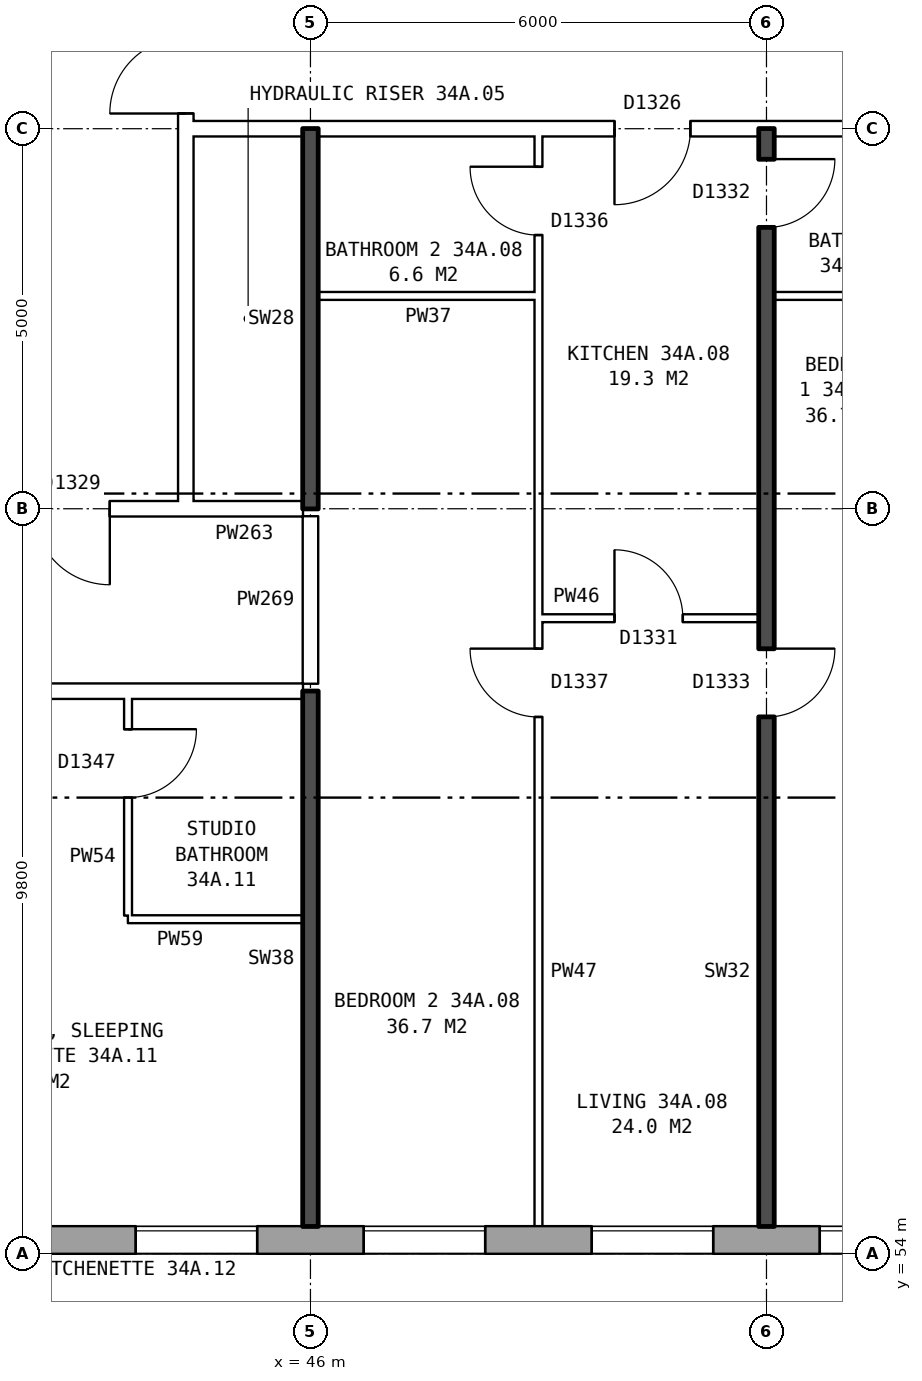
"""IFC4 building model, lengths in metres.
Left out: names, types, materials, properties, quantities, classifications, styles, units other than length and angle.
Written with IfcOpenShell. Run it as: python <this file> out.ifc"""

import sys

from ifc_helpers import new_model, si_unit, direction, frame, frame_2d, origin, place, context, subcontext, project, spatial, rectangle, extrude, element, fill, save


model = new_model("IFC4")
c1 = context("Model", 3, precision=1e-05, world=origin(), true_north=direction((0.0, 1.0)))
c2 = subcontext(c1, "Body", "Model", "MODEL_VIEW")
j1 = project(units=[si_unit("LENGTHUNIT", "METRE"), si_unit("PLANEANGLEUNIT", "RADIAN")], contexts=[c1])
p1 = place(None, origin())
s1 = spatial("IfcSite", under=j1, at=p1, CompositionType="ELEMENT")
p2 = place(p1, origin())
s2 = spatial("IfcBuilding", under=s1, at=p2, CompositionType="ELEMENT")
p3 = place(p2, frame((0.0, 0.0, 123.7)))
s3 = spatial("IfcBuildingStorey", under=s2, at=p3, CompositionType="ELEMENT", Elevation=123.7)
p4 = place(p3, frame((29.825, 54.18, 0.0), z_axis=(0.0, 0.0, 1.0), x_axis=(1.0, 0.0, 0.0)))
e1 = element("IfcWall", 1, at=p4, inside=s3, PredefinedType="STANDARD", context=c2, shape_type="SweptSolid", body=[
    extrude(rectangle(XDim=43.101, YDim=0.36, at=frame_2d((21.55, 0.0))), origin(), (0.0, 0.0, 1.0), 2.85),
])
p5 = place(p4, frame((0.3, 0.0, 0.8)))
e2 = element("IfcOpeningElement", 2, at=p5, cuts=e1, PredefinedType="OPENING", context=c2, shape_type="SweptSolid", body=[
    extrude(rectangle(XDim=1.6, YDim=1.8, at=frame_2d((0.8, 0.9))), frame((0.0, 0.19, 0.0), z_axis=(0.0, -1.0, 0.0), x_axis=(1.0, 0.0, 0.0)), (0.0, 0.0, 1.0), 0.38),
])
p6 = place(p4, frame((4.875, 0.0, 0.8)))
e3 = element("IfcOpeningElement", 3, at=p6, cuts=e1, PredefinedType="OPENING", context=c2, shape_type="SweptSolid", body=[
    extrude(rectangle(XDim=1.6, YDim=1.8, at=frame_2d((0.8, 0.9))), frame((0.0, 0.19, 0.0), z_axis=(0.0, -1.0, 0.0), x_axis=(1.0, 0.0, 0.0)), (0.0, 0.0, 1.0), 0.38),
])
p7 = place(p4, frame((7.875, 0.0, 0.8)))
e4 = element("IfcOpeningElement", 4, at=p7, cuts=e1, PredefinedType="OPENING", context=c2, shape_type="SweptSolid", body=[
    extrude(rectangle(XDim=1.6, YDim=1.8, at=frame_2d((0.8, 0.9))), frame((0.0, 0.19, 0.0), z_axis=(0.0, -1.0, 0.0), x_axis=(1.0, 0.0, 0.0)), (0.0, 0.0, 1.0), 0.38),
])
p8 = place(p4, frame((10.875, 0.0, 0.8)))
e5 = element("IfcOpeningElement", 5, at=p8, cuts=e1, PredefinedType="OPENING", context=c2, shape_type="SweptSolid", body=[
    extrude(rectangle(XDim=1.6, YDim=1.8, at=frame_2d((0.8, 0.9))), frame((0.0, 0.19, 0.0), z_axis=(0.0, -1.0, 0.0), x_axis=(1.0, 0.0, 0.0)), (0.0, 0.0, 1.0), 0.38),
])
p9 = place(p4, frame((13.875, 0.0, 0.8)))
e6 = element("IfcOpeningElement", 6, at=p9, cuts=e1, PredefinedType="OPENING", context=c2, shape_type="SweptSolid", body=[
    extrude(rectangle(XDim=1.6, YDim=1.8, at=frame_2d((0.8, 0.9))), frame((0.0, 0.19, 0.0), z_axis=(0.0, -1.0, 0.0), x_axis=(1.0, 0.0, 0.0)), (0.0, 0.0, 1.0), 0.38),
])
p10 = place(p4, frame((16.875, 0.0, 0.8)))
e7 = element("IfcOpeningElement", 7, at=p10, cuts=e1, PredefinedType="OPENING", context=c2, shape_type="SweptSolid", body=[
    extrude(rectangle(XDim=1.6, YDim=1.8, at=frame_2d((0.8, 0.9))), frame((0.0, 0.19, 0.0), z_axis=(0.0, -1.0, 0.0), x_axis=(1.0, 0.0, 0.0)), (0.0, 0.0, 1.0), 0.38),
])
p11 = place(p4, frame((19.875, 0.0, 0.8)))
e8 = element("IfcOpeningElement", 8, at=p11, cuts=e1, PredefinedType="OPENING", context=c2, shape_type="SweptSolid", body=[
    extrude(rectangle(XDim=1.6, YDim=1.8, at=frame_2d((0.8, 0.9))), frame((0.0, 0.19, 0.0), z_axis=(0.0, -1.0, 0.0), x_axis=(1.0, 0.0, 0.0)), (0.0, 0.0, 1.0), 0.38),
])
p12 = place(p4, frame((22.875, 0.0, 0.8)))
e9 = element("IfcOpeningElement", 9, at=p12, cuts=e1, PredefinedType="OPENING", context=c2, shape_type="SweptSolid", body=[
    extrude(rectangle(XDim=1.6, YDim=1.8, at=frame_2d((0.8, 0.9))), frame((0.0, 0.19, 0.0), z_axis=(0.0, -1.0, 0.0), x_axis=(1.0, 0.0, 0.0)), (0.0, 0.0, 1.0), 0.38),
])
p13 = place(p4, frame((25.875, 0.0, 0.8)))
e10 = element("IfcOpeningElement", 10, at=p13, cuts=e1, PredefinedType="OPENING", context=c2, shape_type="SweptSolid", body=[
    extrude(rectangle(XDim=1.6, YDim=1.8, at=frame_2d((0.8, 0.9))), frame((0.0, 0.19, 0.0), z_axis=(0.0, -1.0, 0.0), x_axis=(1.0, 0.0, 0.0)), (0.0, 0.0, 1.0), 0.38),
])
p14 = place(p4, frame((28.875, 0.0, 0.8)))
e11 = element("IfcOpeningElement", 11, at=p14, cuts=e1, PredefinedType="OPENING", context=c2, shape_type="SweptSolid", body=[
    extrude(rectangle(XDim=1.6, YDim=1.8, at=frame_2d((0.8, 0.9))), frame((0.0, 0.19, 0.0), z_axis=(0.0, -1.0, 0.0), x_axis=(1.0, 0.0, 0.0)), (0.0, 0.0, 1.0), 0.38),
])
p15 = place(p4, frame((31.875, 0.0, 0.8)))
e12 = element("IfcOpeningElement", 12, at=p15, cuts=e1, PredefinedType="OPENING", context=c2, shape_type="SweptSolid", body=[
    extrude(rectangle(XDim=1.6, YDim=1.8, at=frame_2d((0.8, 0.9))), frame((0.0, 0.19, 0.0), z_axis=(0.0, -1.0, 0.0), x_axis=(1.0, 0.0, 0.0)), (0.0, 0.0, 1.0), 0.38),
])
p16 = place(p4, frame((34.875, 0.0, 0.8)))
e13 = element("IfcOpeningElement", 13, at=p16, cuts=e1, PredefinedType="OPENING", context=c2, shape_type="SweptSolid", body=[
    extrude(rectangle(XDim=1.6, YDim=1.8, at=frame_2d((0.8, 0.9))), frame((0.0, 0.19, 0.0), z_axis=(0.0, -1.0, 0.0), x_axis=(1.0, 0.0, 0.0)), (0.0, 0.0, 1.0), 0.38),
])
p17 = place(p4, frame((36.775, 0.0, 0.8)))
e14 = element("IfcOpeningElement", 14, at=p17, cuts=e1, PredefinedType="OPENING", context=c2, shape_type="SweptSolid", body=[
    extrude(rectangle(XDim=1.2, YDim=1.8, at=frame_2d((0.6, 0.9))), frame((0.0, 0.19, 0.0), z_axis=(0.0, -1.0, 0.0), x_axis=(1.0, 0.0, 0.0)), (0.0, 0.0, 1.0), 0.38),
])
p18 = place(p4, frame((40.875, 0.0, 0.8)))
e15 = element("IfcOpeningElement", 15, at=p18, cuts=e1, PredefinedType="OPENING", context=c2, shape_type="SweptSolid", body=[
    extrude(rectangle(XDim=1.6, YDim=1.8, at=frame_2d((0.8, 0.9))), frame((0.0, 0.19, 0.0), z_axis=(0.0, -1.0, 0.0), x_axis=(1.0, 0.0, 0.0)), (0.0, 0.0, 1.0), 0.38),
])
p19 = place(p4, frame((2.2, 0.0, 1.7)))
e16 = element("IfcOpeningElement", 16, at=p19, cuts=e1, PredefinedType="OPENING", context=c2, shape_type="SweptSolid", body=[
    extrude(rectangle(XDim=0.8, YDim=0.9, at=frame_2d((0.4, 0.45))), frame((0.0, 0.19, 0.0), z_axis=(0.0, -1.0, 0.0), x_axis=(1.0, 0.0, 0.0)), (0.0, 0.0, 1.0), 0.38),
])
p20 = place(p4, frame((38.275, 0.0, 0.8)))
e17 = element("IfcOpeningElement", 17, at=p20, cuts=e1, PredefinedType="OPENING", context=c2, shape_type="SweptSolid", body=[
    extrude(rectangle(XDim=0.6, YDim=0.9, at=frame_2d((0.3, 0.45))), frame((0.0, 0.19, 0.0), z_axis=(0.0, -1.0, 0.0), x_axis=(1.0, 0.0, 0.0)), (0.0, 0.0, 1.0), 0.38),
])
p21 = place(p3, frame((44.36, 63.9, 0.0), z_axis=(0.0, 0.0, 1.0), x_axis=(0.0, 1.0, 0.0)))
e18 = element("IfcWall", 18, at=p21, inside=s3, PredefinedType="PARTITIONING", context=c2, shape_type="SweptSolid", body=[
    extrude(rectangle(XDim=12.2, YDim=0.2, at=frame_2d((6.1, 0.0))), origin(), (0.0, 0.0, 1.0), 2.85),
])
p22 = place(p21, frame((5.1, 0.0, 0.0)))
e19 = element("IfcOpeningElement", 19, at=p22, cuts=e18, PredefinedType="OPENING", context=c2, shape_type="SweptSolid", body=[
    extrude(rectangle(XDim=2.0, YDim=2.1, at=frame_2d((1.0, 1.05))), frame((0.0, 0.11, 0.0), z_axis=(0.0, -1.0, 0.0), x_axis=(1.0, 0.0, 0.0)), (0.0, 0.0, 1.0), 0.22),
])
p23 = place(p3, frame((43.6, 58.4, 0.0), z_axis=(0.0, 0.0, 1.0), x_axis=(1.0, 0.0, 0.0)))
e20 = element("IfcWall", 20, at=p23, inside=s3, PredefinedType="PARTITIONING", context=c2, shape_type="SweptSolid", body=[
    extrude(rectangle(XDim=2.3, YDim=0.1, at=frame_2d((1.15, 0.0))), origin(), (0.0, 0.0, 1.0), 2.85),
])
p24 = place(p3, frame((27.11, 61.4, 0.0), z_axis=(0.0, 0.0, 1.0), x_axis=(1.0, 0.0, 0.0)))
e21 = element("IfcWall", 21, at=p24, inside=s3, PredefinedType="PARTITIONING", context=c2, shape_type="SweptSolid", body=[
    extrude(rectangle(XDim=18.79, YDim=0.2, at=frame_2d((9.395, 0.0))), origin(), (0.0, 0.0, 1.0), 2.85),
])
p25 = place(p24, frame((14.19, 0.0, 0.0)))
e22 = element("IfcOpeningElement", 22, at=p25, cuts=e21, PredefinedType="OPENING", context=c2, shape_type="SweptSolid", body=[
    extrude(rectangle(XDim=1.0, YDim=2.1, at=frame_2d((0.5, 1.05))), frame((0.0, 0.11, 0.0), z_axis=(0.0, -1.0, 0.0), x_axis=(1.0, 0.0, 0.0)), (0.0, 0.0, 1.0), 0.22),
])
p26 = place(p24, frame((8.19, 0.0, 0.0)))
e23 = element("IfcOpeningElement", 23, at=p26, cuts=e21, PredefinedType="OPENING", context=c2, shape_type="SweptSolid", body=[
    extrude(rectangle(XDim=1.0, YDim=2.1, at=frame_2d((0.5, 1.05))), frame((0.0, 0.11, 0.0), z_axis=(0.0, -1.0, 0.0), x_axis=(1.0, 0.0, 0.0)), (0.0, 0.0, 1.0), 0.22),
])
p27 = place(p24, frame((1.745, 0.0, 0.0)))
e24 = element("IfcOpeningElement", 24, at=p27, cuts=e21, PredefinedType="OPENING", context=c2, shape_type="SweptSolid", body=[
    extrude(rectangle(XDim=1.0, YDim=2.1, at=frame_2d((0.5, 1.05))), frame((0.0, 0.11, 0.0), z_axis=(0.0, -1.0, 0.0), x_axis=(1.0, 0.0, 0.0)), (0.0, 0.0, 1.0), 0.22),
])
p28 = place(p3, frame((49.0, 62.36, 0.0), z_axis=(0.0, 0.0, 1.0), x_axis=(1.0, 0.0, 0.0)))
e25 = element("IfcWall", 25, at=p28, inside=s3, PredefinedType="PARTITIONING", context=c2, shape_type="SweptSolid", body=[
    extrude(rectangle(XDim=2.9, YDim=0.1, at=frame_2d((1.45, 0.0))), origin(), (0.0, 0.0, 1.0), 2.85),
])
p29 = place(p28, frame((1.0, 0.0, 0.0)))
e26 = element("IfcOpeningElement", 26, at=p29, cuts=e25, PredefinedType="OPENING", context=c2, shape_type="SweptSolid", body=[
    extrude(rectangle(XDim=0.9, YDim=2.1, at=frame_2d((0.45, 1.05))), frame((0.0, 0.06, 0.0), z_axis=(0.0, -1.0, 0.0), x_axis=(1.0, 0.0, 0.0)), (0.0, 0.0, 1.0), 0.12),
])
p30 = place(p3, frame((41.36, 63.8, 0.0), z_axis=(0.0, 0.0, 1.0), x_axis=(1.0, 0.0, 0.0)))
e27 = element("IfcWall", 27, at=p30, inside=s3, PredefinedType="PARTITIONING", context=c2, shape_type="SweptSolid", body=[
    extrude(rectangle(XDim=3.0, YDim=0.2, at=frame_2d((1.5, 0.0))), origin(), (0.0, 0.0, 1.0), 2.85),
])
p31 = place(p30, frame((1.0, 0.0, 0.0)))
e28 = element("IfcOpeningElement", 28, at=p31, cuts=e27, PredefinedType="OPENING", context=c2, shape_type="SweptSolid", body=[
    extrude(rectangle(XDim=1.0, YDim=2.1, at=frame_2d((0.5, 1.05))), frame((0.0, 0.11, 0.0), z_axis=(0.0, -1.0, 0.0), x_axis=(1.0, 0.0, 0.0)), (0.0, 0.0, 1.0), 0.22),
])
p32 = place(p3, frame((44.36, 63.8, 0.0), z_axis=(0.0, 0.0, 1.0), x_axis=(1.0, 0.0, 0.0)))
e29 = element("IfcWall", 29, at=p32, inside=s3, PredefinedType="PARTITIONING", context=c2, shape_type="SweptSolid", body=[
    extrude(rectangle(XDim=1.54, YDim=0.2, at=frame_2d((0.77, 0.0))), origin(), (0.0, 0.0, 1.0), 2.85),
])
p33 = place(p3, frame((46.1, 66.6, 0.0), z_axis=(0.0, 0.0, 1.0), x_axis=(1.0, 0.0, 0.0)))
e30 = element("IfcWall", 30, at=p33, inside=s3, PredefinedType="PARTITIONING", context=c2, shape_type="SweptSolid", body=[
    extrude(rectangle(XDim=2.9, YDim=0.1, at=frame_2d((1.45, 0.0))), origin(), (0.0, 0.0, 1.0), 2.85),
])
p34 = place(p3, frame((52.1, 66.6, 0.0), z_axis=(0.0, 0.0, 1.0), x_axis=(1.0, 0.0, 0.0)))
e31 = element("IfcWall", 31, at=p34, inside=s3, PredefinedType="PARTITIONING", context=c2, shape_type="SweptSolid", body=[
    extrude(rectangle(XDim=2.8, YDim=0.1, at=frame_2d((1.4, 0.0))), origin(), (0.0, 0.0, 1.0), 2.85),
])
p35 = place(p3, frame((44.36, 68.8, 0.0), z_axis=(0.0, 0.0, 1.0), x_axis=(1.0, 0.0, 0.0)))
e32 = element("IfcWall", 32, at=p35, inside=s3, PredefinedType="PARTITIONING", context=c2, shape_type="SweptSolid", body=[
    extrude(rectangle(XDim=19.28, YDim=0.2, at=frame_2d((9.64, 0.0))), origin(), (0.0, 0.0, 1.0), 2.85),
])
p36 = place(p35, frame((14.64, 0.0, 0.0)))
e33 = element("IfcOpeningElement", 33, at=p36, cuts=e32, PredefinedType="OPENING", context=c2, shape_type="SweptSolid", body=[
    extrude(rectangle(XDim=1.0, YDim=2.1, at=frame_2d((0.5, 1.05))), frame((0.0, 0.11, 0.0), z_axis=(0.0, -1.0, 0.0), x_axis=(1.0, 0.0, 0.0)), (0.0, 0.0, 1.0), 0.22),
])
p37 = place(p35, frame((5.64, 0.0, 0.0)))
e34 = element("IfcOpeningElement", 34, at=p37, cuts=e32, PredefinedType="OPENING", context=c2, shape_type="SweptSolid", body=[
    extrude(rectangle(XDim=1.0, YDim=2.1, at=frame_2d((0.5, 1.05))), frame((0.0, 0.11, 0.0), z_axis=(0.0, -1.0, 0.0), x_axis=(1.0, 0.0, 0.0)), (0.0, 0.0, 1.0), 0.22),
])
p38 = place(p3, frame((43.6, 58.45, 0.0), z_axis=(0.0, 0.0, 1.0), x_axis=(0.0, 1.0, 0.0)))
e35 = element("IfcWall", 35, at=p38, inside=s3, PredefinedType="PARTITIONING", context=c2, shape_type="SweptSolid", body=[
    extrude(rectangle(XDim=2.85, YDim=0.1, at=frame_2d((1.425, 0.0))), origin(), (0.0, 0.0, 1.0), 2.85),
])
p39 = place(p38, frame((1.55, 0.0, 0.0)))
e36 = element("IfcOpeningElement", 36, at=p39, cuts=e35, PredefinedType="OPENING", context=c2, shape_type="SweptSolid", body=[
    extrude(rectangle(XDim=0.9, YDim=2.1, at=frame_2d((0.45, 1.05))), frame((0.0, 0.06, 0.0), z_axis=(0.0, -1.0, 0.0), x_axis=(1.0, 0.0, 0.0)), (0.0, 0.0, 1.0), 0.12),
])
p40 = place(p3, frame((46.0, 54.36, 0.0), z_axis=(0.0, 0.0, 1.0), x_axis=(0.0, 1.0, 0.0)))
e37 = element("IfcWall", 37, at=p40, inside=s3, PredefinedType="SOLIDWALL", context=c2, shape_type="SweptSolid", body=[
    extrude(rectangle(XDim=7.04, YDim=0.2, at=frame_2d((3.52, 0.0))), origin(), (0.0, 0.0, 1.0), 2.85),
])
p41 = place(p3, frame((46.0, 61.5, 0.0), z_axis=(0.0, 0.0, 1.0), x_axis=(0.0, 1.0, 0.0)))
e38 = element("IfcWall", 38, at=p41, inside=s3, PredefinedType="PARTITIONING", context=c2, shape_type="SweptSolid", body=[
    extrude(rectangle(XDim=2.2, YDim=0.2, at=frame_2d((1.1, 0.0))), origin(), (0.0, 0.0, 1.0), 2.85),
])
p42 = place(p3, frame((46.0, 63.8, 0.0), z_axis=(0.0, 0.0, 1.0), x_axis=(0.0, 1.0, 0.0)))
e39 = element("IfcWall", 39, at=p42, inside=s3, PredefinedType="SOLIDWALL", context=c2, shape_type="SweptSolid", body=[
    extrude(rectangle(XDim=5.0, YDim=0.2, at=frame_2d((2.5, 0.0))), origin(), (0.0, 0.0, 1.0), 2.85),
])
p43 = place(p3, frame((49.0, 54.36, 0.0), z_axis=(0.0, 0.0, 1.0), x_axis=(0.0, 1.0, 0.0)))
e40 = element("IfcWall", 40, at=p43, inside=s3, PredefinedType="PARTITIONING", context=c2, shape_type="SweptSolid", body=[
    extrude(rectangle(XDim=14.34, YDim=0.1, at=frame_2d((7.17, 0.0))), origin(), (0.0, 0.0, 1.0), 2.85),
])
p44 = place(p43, frame((6.7, 0.0, 0.0)))
e41 = element("IfcOpeningElement", 41, at=p44, cuts=e40, PredefinedType="OPENING", context=c2, shape_type="SweptSolid", body=[
    extrude(rectangle(XDim=0.9, YDim=2.1, at=frame_2d((0.45, 1.05))), frame((0.0, 0.06, 0.0), z_axis=(0.0, -1.0, 0.0), x_axis=(1.0, 0.0, 0.0)), (0.0, 0.0, 1.0), 0.12),
])
p45 = place(p43, frame((13.04, 0.0, 0.0)))
e42 = element("IfcOpeningElement", 42, at=p45, cuts=e40, PredefinedType="OPENING", context=c2, shape_type="SweptSolid", body=[
    extrude(rectangle(XDim=0.9, YDim=2.1, at=frame_2d((0.45, 1.05))), frame((0.0, 0.06, 0.0), z_axis=(0.0, -1.0, 0.0), x_axis=(1.0, 0.0, 0.0)), (0.0, 0.0, 1.0), 0.12),
])
p46 = place(p3, frame((52.0, 54.36, 0.0), z_axis=(0.0, 0.0, 1.0), x_axis=(0.0, 1.0, 0.0)))
e43 = element("IfcWall", 43, at=p46, inside=s3, PredefinedType="SOLIDWALL", context=c2, shape_type="SweptSolid", body=[
    extrude(rectangle(XDim=14.44, YDim=0.2, at=frame_2d((7.22, 0.0))), origin(), (0.0, 0.0, 1.0), 2.85),
])
p47 = place(p46, frame((6.7, 0.0, 0.0)))
e44 = element("IfcOpeningElement", 44, at=p47, cuts=e43, PredefinedType="OPENING", context=c2, shape_type="SweptSolid", body=[
    extrude(rectangle(XDim=0.9, YDim=2.1, at=frame_2d((0.45, 1.05))), frame((0.0, 0.11, 0.0), z_axis=(0.0, -1.0, 0.0), x_axis=(1.0, 0.0, 0.0)), (0.0, 0.0, 1.0), 0.22),
])
p48 = place(p46, frame((13.14, 0.0, 0.0)))
e45 = element("IfcOpeningElement", 45, at=p48, cuts=e43, PredefinedType="OPENING", context=c2, shape_type="SweptSolid", body=[
    extrude(rectangle(XDim=0.9, YDim=2.1, at=frame_2d((0.45, 1.05))), frame((0.0, 0.11, 0.0), z_axis=(0.0, -1.0, 0.0), x_axis=(1.0, 0.0, 0.0)), (0.0, 0.0, 1.0), 0.22),
])
p49 = place(p9, origin())
e46 = element("IfcWindow", 46, at=p49, inside=s3, PartitioningType="SINGLE_PANEL", PredefinedType="WINDOW", context=c2, shape_type="SweptSolid", body=[
    extrude(rectangle(XDim=1.6, YDim=1.8, at=frame_2d((0.8, 0.9))), frame((0.0, 0.15, 0.0), z_axis=(0.0, -1.0, 0.0), x_axis=(1.0, 0.0, 0.0)), (0.0, 0.0, 1.0), 0.06),
])
fill(e6, e46)
p50 = place(p10, origin())
e47 = element("IfcWindow", 47, at=p50, inside=s3, PartitioningType="SINGLE_PANEL", PredefinedType="WINDOW", context=c2, shape_type="SweptSolid", body=[
    extrude(rectangle(XDim=1.6, YDim=1.8, at=frame_2d((0.8, 0.9))), frame((0.0, 0.15, 0.0), z_axis=(0.0, -1.0, 0.0), x_axis=(1.0, 0.0, 0.0)), (0.0, 0.0, 1.0), 0.06),
])
fill(e7, e47)
p51 = place(p11, origin())
e48 = element("IfcWindow", 48, at=p51, inside=s3, PartitioningType="SINGLE_PANEL", PredefinedType="WINDOW", context=c2, shape_type="SweptSolid", body=[
    extrude(rectangle(XDim=1.6, YDim=1.8, at=frame_2d((0.8, 0.9))), frame((0.0, 0.15, 0.0), z_axis=(0.0, -1.0, 0.0), x_axis=(1.0, 0.0, 0.0)), (0.0, 0.0, 1.0), 0.06),
])
fill(e8, e48)
p52 = place(p12, origin())
e49 = element("IfcWindow", 49, at=p52, inside=s3, PartitioningType="SINGLE_PANEL", PredefinedType="WINDOW", context=c2, shape_type="SweptSolid", body=[
    extrude(rectangle(XDim=1.6, YDim=1.8, at=frame_2d((0.8, 0.9))), frame((0.0, 0.15, 0.0), z_axis=(0.0, -1.0, 0.0), x_axis=(1.0, 0.0, 0.0)), (0.0, 0.0, 1.0), 0.06),
])
fill(e9, e49)
p53 = place(p22, origin())
e50 = element("IfcDoor", 50, at=p53, inside=s3, OperationType="DOUBLE_DOOR_SINGLE_SWING", PredefinedType="DOOR", context=c2, shape_type="SweptSolid", body=[
    extrude(rectangle(XDim=2.0, YDim=2.1, at=frame_2d((1.0, 1.05))), frame((0.0, 0.025, 0.0), z_axis=(0.0, -1.0, 0.0), x_axis=(1.0, 0.0, 0.0)), (0.0, 0.0, 1.0), 0.05),
])
fill(e19, e50)
p54 = place(p31, frame((1.0, 0.0, 0.0), z_axis=(0.0, 0.0, 1.0), x_axis=(-1.0, 0.0, 0.0)))
e51 = element("IfcDoor", 51, at=p54, inside=s3, OperationType="SINGLE_SWING_LEFT", PredefinedType="DOOR", context=c2, shape_type="SweptSolid", body=[
    extrude(rectangle(XDim=1.0, YDim=2.1, at=frame_2d((0.5, 1.05))), frame((0.0, 0.025, 0.0), z_axis=(0.0, -1.0, 0.0), x_axis=(1.0, 0.0, 0.0)), (0.0, 0.0, 1.0), 0.05),
])
fill(e28, e51)
p55 = place(p47, frame((0.9, 0.0, 0.0), z_axis=(0.0, 0.0, 1.0), x_axis=(-1.0, 0.0, 0.0)))
e52 = element("IfcDoor", 52, at=p55, inside=s3, OperationType="SINGLE_SWING_LEFT", PredefinedType="DOOR", context=c2, shape_type="SweptSolid", body=[
    extrude(rectangle(XDim=0.9, YDim=2.1, at=frame_2d((0.45, 1.05))), frame((0.0, 0.025, 0.0), z_axis=(0.0, -1.0, 0.0), x_axis=(1.0, 0.0, 0.0)), (0.0, 0.0, 1.0), 0.05),
])
fill(e44, e52)
p56 = place(p44, origin())
e53 = element("IfcDoor", 53, at=p56, inside=s3, OperationType="SINGLE_SWING_RIGHT", PredefinedType="DOOR", context=c2, shape_type="SweptSolid", body=[
    extrude(rectangle(XDim=0.9, YDim=2.1, at=frame_2d((0.45, 1.05))), frame((0.0, 0.025, 0.0), z_axis=(0.0, -1.0, 0.0), x_axis=(1.0, 0.0, 0.0)), (0.0, 0.0, 1.0), 0.05),
])
fill(e41, e53)
p57 = place(p37, frame((1.0, 0.0, 0.0), z_axis=(0.0, 0.0, 1.0), x_axis=(-1.0, 0.0, 0.0)))
e54 = element("IfcDoor", 54, at=p57, inside=s3, OperationType="SINGLE_SWING_RIGHT", PredefinedType="DOOR", context=c2, shape_type="SweptSolid", body=[
    extrude(rectangle(XDim=1.0, YDim=2.1, at=frame_2d((0.5, 1.05))), frame((0.0, 0.025, 0.0), z_axis=(0.0, -1.0, 0.0), x_axis=(1.0, 0.0, 0.0)), (0.0, 0.0, 1.0), 0.05),
])
fill(e34, e54)
p58 = place(p29, origin())
e55 = element("IfcDoor", 55, at=p58, inside=s3, OperationType="SINGLE_SWING_LEFT", PredefinedType="DOOR", context=c2, shape_type="SweptSolid", body=[
    extrude(rectangle(XDim=0.9, YDim=2.1, at=frame_2d((0.45, 1.05))), frame((0.0, 0.025, 0.0), z_axis=(0.0, -1.0, 0.0), x_axis=(1.0, 0.0, 0.0)), (0.0, 0.0, 1.0), 0.05),
])
fill(e26, e55)
p59 = place(p48, frame((0.9, 0.0, 0.0), z_axis=(0.0, 0.0, 1.0), x_axis=(-1.0, 0.0, 0.0)))
e56 = element("IfcDoor", 56, at=p59, inside=s3, OperationType="SINGLE_SWING_LEFT", PredefinedType="DOOR", context=c2, shape_type="SweptSolid", body=[
    extrude(rectangle(XDim=0.9, YDim=2.1, at=frame_2d((0.45, 1.05))), frame((0.0, 0.025, 0.0), z_axis=(0.0, -1.0, 0.0), x_axis=(1.0, 0.0, 0.0)), (0.0, 0.0, 1.0), 0.05),
])
fill(e45, e56)
p60 = place(p45, origin())
e57 = element("IfcDoor", 57, at=p60, inside=s3, OperationType="SINGLE_SWING_RIGHT", PredefinedType="DOOR", context=c2, shape_type="SweptSolid", body=[
    extrude(rectangle(XDim=0.9, YDim=2.1, at=frame_2d((0.45, 1.05))), frame((0.0, 0.025, 0.0), z_axis=(0.0, -1.0, 0.0), x_axis=(1.0, 0.0, 0.0)), (0.0, 0.0, 1.0), 0.05),
])
fill(e42, e57)
p61 = place(p39, frame((0.9, 0.0, 0.0), z_axis=(0.0, 0.0, 1.0), x_axis=(-1.0, 0.0, 0.0)))
e58 = element("IfcDoor", 58, at=p61, inside=s3, OperationType="SINGLE_SWING_LEFT", PredefinedType="DOOR", context=c2, shape_type="SweptSolid", body=[
    extrude(rectangle(XDim=0.9, YDim=2.1, at=frame_2d((0.45, 1.05))), frame((0.0, 0.025, 0.0), z_axis=(0.0, -1.0, 0.0), x_axis=(1.0, 0.0, 0.0)), (0.0, 0.0, 1.0), 0.05),
])
fill(e36, e58)
save(model, sys.argv[1])
